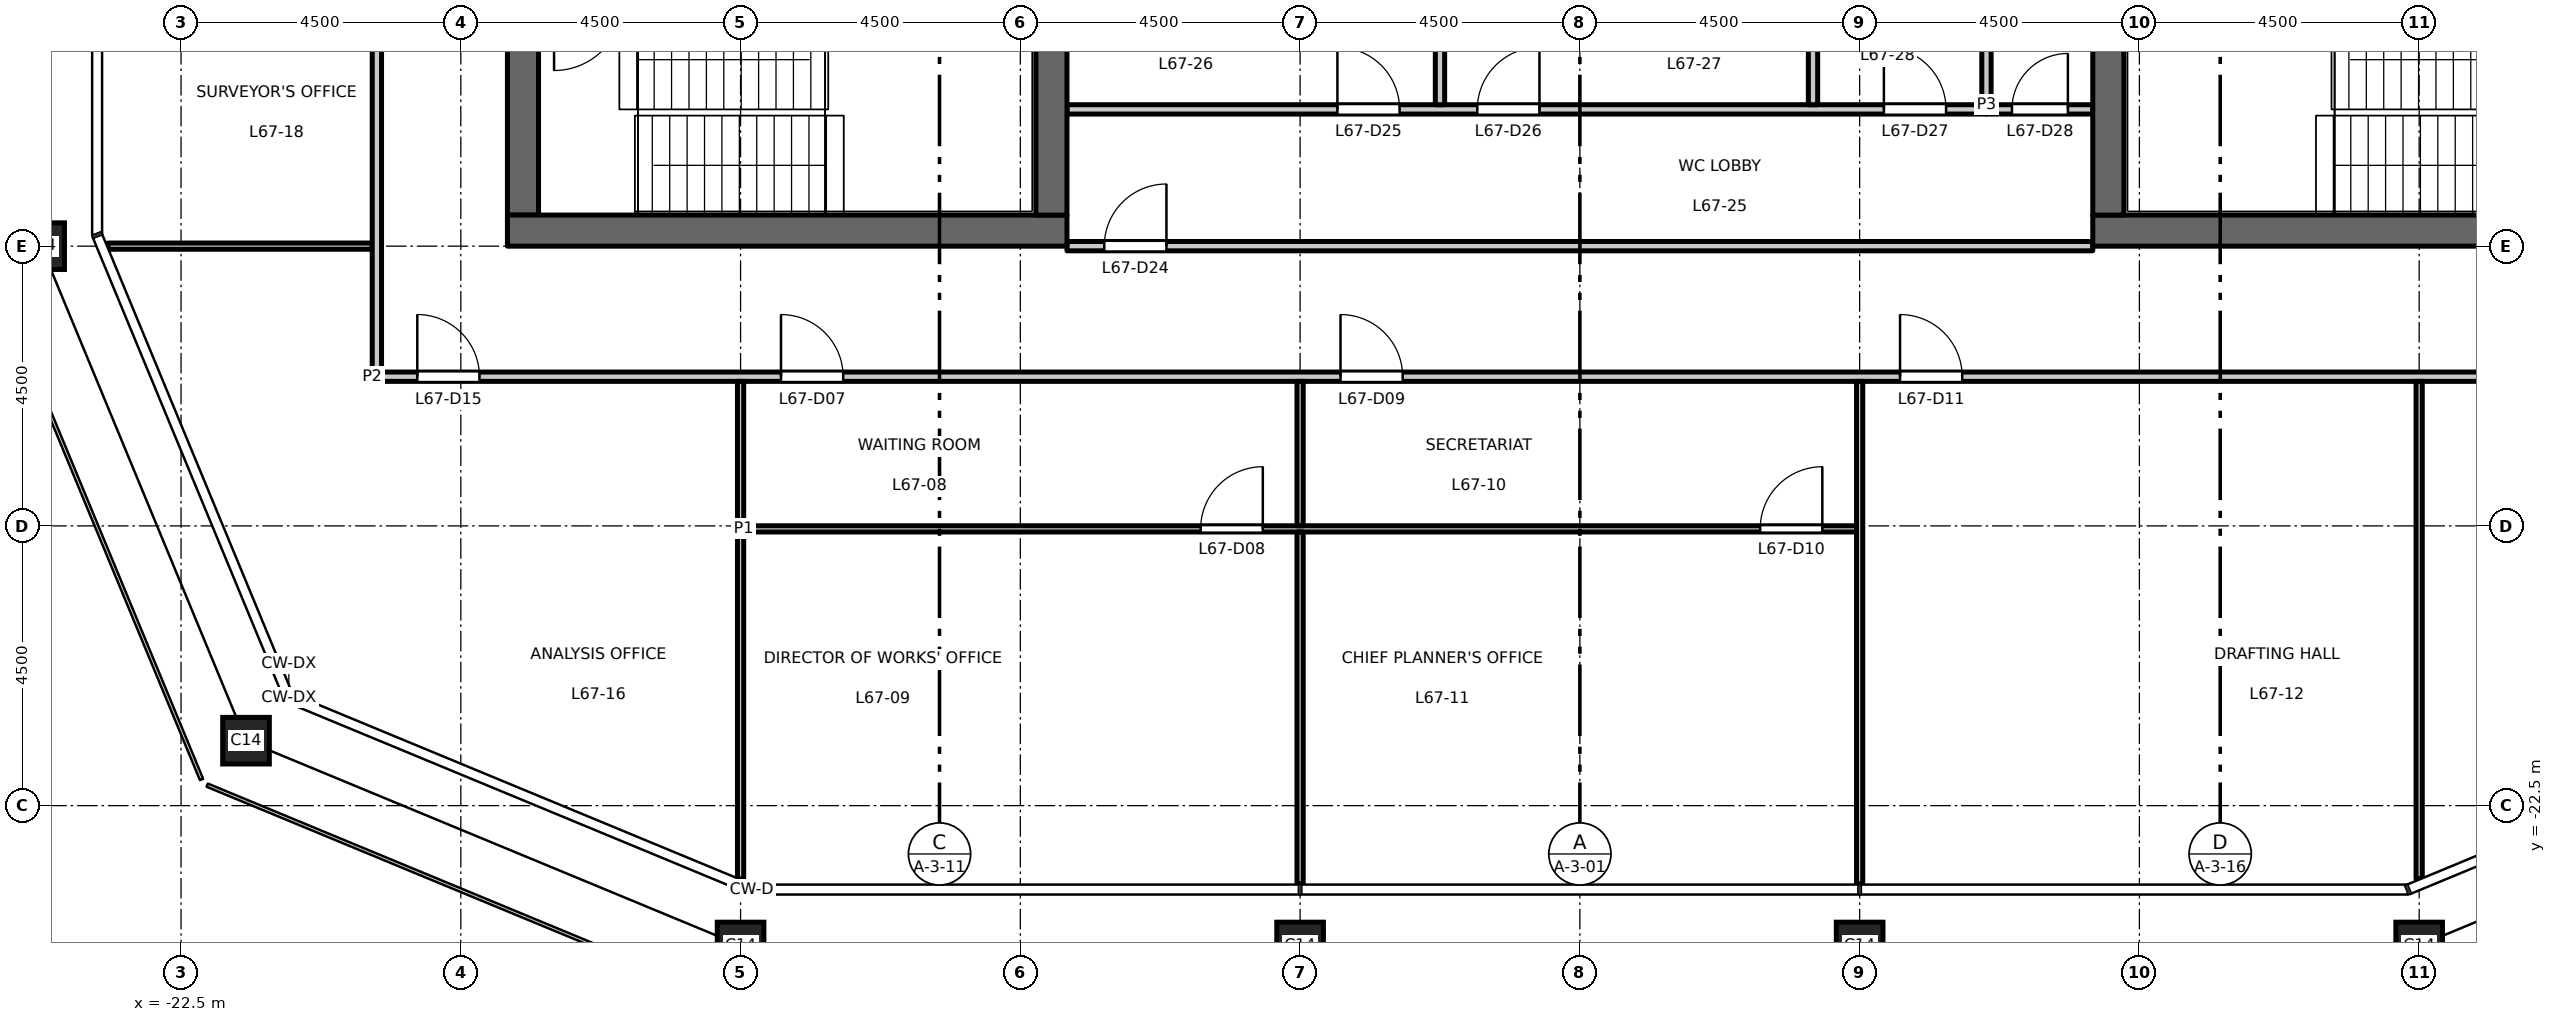
"""IFC4 building model, lengths in metres.
Left out: names, types, materials, properties, quantities, classifications, styles, units other than length and angle.
Written with IfcOpenShell. Run it as: python <this file> out.ifc"""

import sys

from ifc_helpers import new_model, si_unit, direction, frame, frame_2d, origin, origin_2d, place, context, subcontext, project, spatial, rectangle, hollow_rectangle, extrude, element, fill, save


model = new_model("IFC4")
c1 = context("Model", 3, precision=1e-05, world=origin(), true_north=direction((0.0, 1.0)))
c2 = subcontext(c1, "Body", "Model", "MODEL_VIEW")
j1 = project(units=[si_unit("LENGTHUNIT", "METRE"), si_unit("PLANEANGLEUNIT", "RADIAN")], contexts=[c1])
p1 = place(None, origin())
s1 = spatial("IfcSite", under=j1, at=p1, CompositionType="ELEMENT")
p2 = place(p1, origin())
s2 = spatial("IfcBuilding", under=s1, at=p2, CompositionType="ELEMENT")
p3 = place(p2, frame((0.0, 0.0, 312.2)))
s3 = spatial("IfcBuildingStorey", under=s2, at=p3, CompositionType="ELEMENT", Elevation=312.2)
for number, where, z_axis, x_axis in (
    (1, (-13.5, -24.75, 0.0), (0.0, 0.0, 1.0), (1.0, 0.0, 0.0)),
    (2, (-4.5, -24.75, 0.0), (0.0, 0.0, 1.0), (1.0, 0.0, 0.0)),
    (3, (4.5, -24.75, 0.0), (0.0, 0.0, 1.0), (1.0, 0.0, 0.0)),
    (4, (13.5, -24.75, 0.0), (0.0, 0.0, 1.0), (1.0, 0.0, 0.0)),
    (5, (-24.75, -13.5, 0.0), (0.0, 0.0, 1.0), (1.0, 0.0, 0.0)),
    (6, (-21.455, -21.455, 0.0), (0.0, 0.0, 1.0), (1.0, 0.0, 0.0)),
):
    element("IfcColumn", number, at=place(p3, frame(where, z_axis=z_axis, x_axis=x_axis)), inside=s3, PredefinedType="COLUMN", context=c2, shape_type="SweptSolid", body=[
        extrude(hollow_rectangle(XDim=0.75, YDim=0.75, WallThickness=0.04, at=origin_2d()), origin(), (0.0, 0.0, 1.0), 4.5),
    ])
p4 = place(p3, frame((-17.0, -13.0, 0.0), z_axis=(0.0, 0.0, 1.0), x_axis=(0.0, 1.0, 0.0)))
e7 = element("IfcWall", 7, at=p4, inside=s3, PredefinedType="SHEAR", context=c2, shape_type="SweptSolid", body=[
    extrude(rectangle(XDim=26.0, YDim=0.5, at=frame_2d((13.0, 0.0))), origin(), (0.0, 0.0, 1.0), 4.35),
])
p5 = place(p4, frame((16.825, 0.0, 0.0)))
e8 = element("IfcOpeningElement", 8, at=p5, cuts=e7, PredefinedType="OPENING", context=c2, shape_type="SweptSolid", body=[
    extrude(rectangle(XDim=1.8, YDim=2.1, at=frame_2d((0.9, 1.05))), frame((0.0, 0.26, 0.0), z_axis=(0.0, -1.0, 0.0), x_axis=(1.0, 0.0, 0.0)), (0.0, 0.0, 1.0), 0.52),
])
p6 = place(p4, frame((7.375, 0.0, 0.0)))
e9 = element("IfcOpeningElement", 9, at=p6, cuts=e7, PredefinedType="OPENING", context=c2, shape_type="SweptSolid", body=[
    extrude(rectangle(XDim=1.8, YDim=2.1, at=frame_2d((0.9, 1.05))), frame((0.0, 0.26, 0.0), z_axis=(0.0, -1.0, 0.0), x_axis=(1.0, 0.0, 0.0)), (0.0, 0.0, 1.0), 0.52),
])
p7 = place(p3, frame((-8.25, -13.25, 0.0), z_axis=(0.0, 0.0, 1.0), x_axis=(-1.0, 0.0, 0.0)))
e10 = element("IfcWall", 10, at=p7, inside=s3, PredefinedType="SHEAR", context=c2, shape_type="SweptSolid", body=[
    extrude(rectangle(XDim=9.0, YDim=0.5, at=frame_2d((4.5, 0.0))), origin(), (0.0, 0.0, 1.0), 4.35),
])
p8 = place(p3, frame((-8.5, -13.0, 0.0), z_axis=(0.0, 0.0, 1.0), x_axis=(0.0, 1.0, 0.0)))
e11 = element("IfcWall", 11, at=p8, inside=s3, PredefinedType="SHEAR", context=c2, shape_type="SweptSolid", body=[
    extrude(rectangle(XDim=26.0, YDim=0.5, at=frame_2d((13.0, 0.0))), origin(), (0.0, 0.0, 1.0), 4.35),
])
p9 = place(p3, frame((8.25, -13.25, 0.0), z_axis=(0.0, 0.0, 1.0), x_axis=(1.0, 0.0, 0.0)))
e12 = element("IfcWall", 12, at=p9, inside=s3, PredefinedType="SHEAR", context=c2, shape_type="SweptSolid", body=[
    extrude(rectangle(XDim=9.0, YDim=0.5, at=frame_2d((4.5, 0.0))), origin(), (0.0, 0.0, 1.0), 4.35),
])
p10 = place(p3, frame((8.5, -13.0, 0.0), z_axis=(0.0, 0.0, 1.0), x_axis=(0.0, 1.0, 0.0)))
e13 = element("IfcWall", 13, at=p10, inside=s3, PredefinedType="SHEAR", context=c2, shape_type="SweptSolid", body=[
    extrude(rectangle(XDim=26.0, YDim=0.5, at=frame_2d((13.0, 0.0))), origin(), (0.0, 0.0, 1.0), 4.35),
])
p11 = place(p3, frame((-13.45, -18.048, 0.0), z_axis=(0.0, 0.0, 1.0), x_axis=(1.0, 0.0, 0.0)))
e14 = element("IfcWall", 14, at=p11, inside=s3, PredefinedType="PARTITIONING", context=c2, shape_type="SweptSolid", body=[
    extrude(rectangle(XDim=17.9, YDim=0.1, at=frame_2d((8.95, 0.0))), origin(), (0.0, 0.0, 1.0), 3.99),
])
p12 = place(p11, frame((7.35, 0.0, 0.0)))
e15 = element("IfcOpeningElement", 15, at=p12, cuts=e14, PredefinedType="OPENING", context=c2, shape_type="SweptSolid", body=[
    extrude(rectangle(XDim=1.0, YDim=2.1, at=frame_2d((0.5, 1.05))), frame((0.0, 0.06, 0.0), z_axis=(0.0, -1.0, 0.0), x_axis=(1.0, 0.0, 0.0)), (0.0, 0.0, 1.0), 0.12),
])
p13 = place(p11, frame((16.35, 0.0, 0.0)))
e16 = element("IfcOpeningElement", 16, at=p13, cuts=e14, PredefinedType="OPENING", context=c2, shape_type="SweptSolid", body=[
    extrude(rectangle(XDim=1.0, YDim=2.1, at=frame_2d((0.5, 1.05))), frame((0.0, 0.06, 0.0), z_axis=(0.0, -1.0, 0.0), x_axis=(1.0, 0.0, 0.0)), (0.0, 0.0, 1.0), 0.12),
])
p14 = place(p3, frame((-19.425, -15.6, 0.0), z_axis=(0.0, 0.0, 1.0), x_axis=(1.0, 0.0, 0.0)))
e17 = element("IfcWall", 17, at=p14, inside=s3, PredefinedType="PARTITIONING", context=c2, shape_type="SweptSolid", body=[
    extrude(rectangle(XDim=38.85, YDim=0.15, at=frame_2d((19.425, 0.0))), origin(), (0.0, 0.0, 1.0), 4.35),
])
p15 = place(p14, frame((6.575, 0.0, 0.0)))
e18 = element("IfcOpeningElement", 18, at=p15, cuts=e17, PredefinedType="OPENING", context=c2, shape_type="SweptSolid", body=[
    extrude(rectangle(XDim=1.0, YDim=2.1, at=frame_2d((0.5, 1.05))), frame((0.0, 0.085, 0.0), z_axis=(0.0, -1.0, 0.0), x_axis=(1.0, 0.0, 0.0)), (0.0, 0.0, 1.0), 0.17),
])
p16 = place(p14, frame((15.575, 0.0, 0.0)))
e19 = element("IfcOpeningElement", 19, at=p16, cuts=e17, PredefinedType="OPENING", context=c2, shape_type="SweptSolid", body=[
    extrude(rectangle(XDim=1.0, YDim=2.1, at=frame_2d((0.5, 1.05))), frame((0.0, 0.085, 0.0), z_axis=(0.0, -1.0, 0.0), x_axis=(1.0, 0.0, 0.0)), (0.0, 0.0, 1.0), 0.17),
])
p17 = place(p14, frame((24.575, 0.0, 0.0)))
e20 = element("IfcOpeningElement", 20, at=p17, cuts=e17, PredefinedType="OPENING", context=c2, shape_type="SweptSolid", body=[
    extrude(rectangle(XDim=1.0, YDim=2.1, at=frame_2d((0.5, 1.05))), frame((0.0, 0.085, 0.0), z_axis=(0.0, -1.0, 0.0), x_axis=(1.0, 0.0, 0.0)), (0.0, 0.0, 1.0), 0.17),
])
p18 = place(p14, frame((0.725, 0.0, 0.0)))
e21 = element("IfcOpeningElement", 21, at=p18, cuts=e17, PredefinedType="OPENING", context=c2, shape_type="SweptSolid", body=[
    extrude(rectangle(XDim=1.0, YDim=2.1, at=frame_2d((0.5, 1.05))), frame((0.0, 0.085, 0.0), z_axis=(0.0, -1.0, 0.0), x_axis=(1.0, 0.0, 0.0)), (0.0, 0.0, 1.0), 0.17),
])
p19 = place(p14, frame((37.075, 0.0, 0.0)))
e22 = element("IfcOpeningElement", 22, at=p19, cuts=e17, PredefinedType="OPENING", context=c2, shape_type="SweptSolid", body=[
    extrude(rectangle(XDim=1.0, YDim=2.1, at=frame_2d((0.5, 1.05))), frame((0.0, 0.085, 0.0), z_axis=(0.0, -1.0, 0.0), x_axis=(1.0, 0.0, 0.0)), (0.0, 0.0, 1.0), 0.17),
])
p20 = place(p3, frame((-23.678, -13.5, 0.0), z_axis=(0.0, 0.0, 1.0), x_axis=(1.0, 0.0, 0.0)))
e23 = element("IfcWall", 23, at=p20, inside=s3, PredefinedType="PARTITIONING", context=c2, shape_type="SweptSolid", body=[
    extrude(rectangle(XDim=4.253, YDim=0.1, at=frame_2d((2.126, 0.0))), origin(), (0.0, 0.0, 1.0), 4.35),
])
p21 = place(p3, frame((-8.25, -13.5, 0.0), z_axis=(0.0, 0.0, 1.0), x_axis=(1.0, 0.0, 0.0)))
e24 = element("IfcWall", 24, at=p21, inside=s3, PredefinedType="PARTITIONING", context=c2, shape_type="SweptSolid", body=[
    extrude(rectangle(XDim=16.5, YDim=0.15, at=frame_2d((8.25, 0.0))), origin(), (0.0, 0.0, 1.0), 4.35),
])
p22 = place(p21, frame((0.6, 0.0, 0.0)))
e25 = element("IfcOpeningElement", 25, at=p22, cuts=e24, PredefinedType="OPENING", context=c2, shape_type="SweptSolid", body=[
    extrude(rectangle(XDim=1.0, YDim=2.1, at=frame_2d((0.5, 1.05))), frame((0.0, 0.085, 0.0), z_axis=(0.0, -1.0, 0.0), x_axis=(1.0, 0.0, 0.0)), (0.0, 0.0, 1.0), 0.17),
])
p23 = place(p3, frame((-8.25, -11.3, 0.0), z_axis=(0.0, 0.0, 1.0), x_axis=(1.0, 0.0, 0.0)))
e26 = element("IfcWall", 26, at=p23, inside=s3, PredefinedType="PARTITIONING", context=c2, shape_type="SweptSolid", body=[
    extrude(rectangle(XDim=14.79, YDim=0.15, at=frame_2d((7.395, 0.0))), origin(), (0.0, 0.0, 1.0), 4.35),
])
p24 = place(p23, frame((4.35, 0.0, 0.0)))
e27 = element("IfcOpeningElement", 27, at=p24, cuts=e26, PredefinedType="OPENING", context=c2, shape_type="SweptSolid", body=[
    extrude(rectangle(XDim=1.0, YDim=2.1, at=frame_2d((0.5, 1.05))), frame((0.0, 0.085, 0.0), z_axis=(0.0, -1.0, 0.0), x_axis=(1.0, 0.0, 0.0)), (0.0, 0.0, 1.0), 0.17),
])
p25 = place(p23, frame((6.6, 0.0, 0.0)))
e28 = element("IfcOpeningElement", 28, at=p25, cuts=e26, PredefinedType="OPENING", context=c2, shape_type="SweptSolid", body=[
    extrude(rectangle(XDim=1.0, YDim=2.1, at=frame_2d((0.5, 1.05))), frame((0.0, 0.085, 0.0), z_axis=(0.0, -1.0, 0.0), x_axis=(1.0, 0.0, 0.0)), (0.0, 0.0, 1.0), 0.17),
])
p26 = place(p23, frame((13.14, 0.0, 0.0)))
e29 = element("IfcOpeningElement", 29, at=p26, cuts=e26, PredefinedType="OPENING", context=c2, shape_type="SweptSolid", body=[
    extrude(rectangle(XDim=1.0, YDim=2.1, at=frame_2d((0.5, 1.05))), frame((0.0, 0.085, 0.0), z_axis=(0.0, -1.0, 0.0), x_axis=(1.0, 0.0, 0.0)), (0.0, 0.0, 1.0), 0.17),
])
p27 = place(p3, frame((6.54, -11.3, 0.0), z_axis=(0.0, 0.0, 1.0), x_axis=(1.0, 0.0, 0.0)))
e30 = element("IfcWall", 30, at=p27, inside=s3, PredefinedType="PARTITIONING", context=c2, shape_type="SweptSolid", body=[
    extrude(rectangle(XDim=1.71, YDim=0.15, at=frame_2d((0.855, 0.0))), origin(), (0.0, 0.0, 1.0), 4.35),
])
p28 = place(p27, frame((0.41, 0.0, 0.0)))
e31 = element("IfcOpeningElement", 31, at=p28, cuts=e30, PredefinedType="OPENING", context=c2, shape_type="SweptSolid", body=[
    extrude(rectangle(XDim=0.9, YDim=2.1, at=frame_2d((0.45, 1.05))), frame((0.0, 0.085, 0.0), z_axis=(0.0, -1.0, 0.0), x_axis=(1.0, 0.0, 0.0)), (0.0, 0.0, 1.0), 0.17),
])
p29 = place(p3, frame((-19.35, -15.525, 0.0), z_axis=(0.0, 0.0, 1.0), x_axis=(0.0, 1.0, 0.0)))
e32 = element("IfcWall", 32, at=p29, inside=s3, PredefinedType="PARTITIONING", context=c2, shape_type="SweptSolid", body=[
    extrude(rectangle(XDim=31.05, YDim=0.15, at=frame_2d((15.525, 0.0))), origin(), (0.0, 0.0, 1.0), 4.35),
])
p30 = place(p29, frame((9.375, 0.0, 0.0)))
e33 = element("IfcOpeningElement", 33, at=p30, cuts=e32, PredefinedType="OPENING", context=c2, shape_type="SweptSolid", body=[
    extrude(rectangle(XDim=1.0, YDim=2.1, at=frame_2d((0.5, 1.05))), frame((0.0, 0.085, 0.0), z_axis=(0.0, -1.0, 0.0), x_axis=(1.0, 0.0, 0.0)), (0.0, 0.0, 1.0), 0.17),
])
p31 = place(p29, frame((11.625, 0.0, 0.0)))
e34 = element("IfcOpeningElement", 34, at=p31, cuts=e32, PredefinedType="OPENING", context=c2, shape_type="SweptSolid", body=[
    extrude(rectangle(XDim=1.0, YDim=2.1, at=frame_2d((0.5, 1.05))), frame((0.0, 0.085, 0.0), z_axis=(0.0, -1.0, 0.0), x_axis=(1.0, 0.0, 0.0)), (0.0, 0.0, 1.0), 0.17),
])
p32 = place(p29, frame((27.375, 0.0, 0.0)))
e35 = element("IfcOpeningElement", 35, at=p32, cuts=e32, PredefinedType="OPENING", context=c2, shape_type="SweptSolid", body=[
    extrude(rectangle(XDim=1.0, YDim=2.1, at=frame_2d((0.5, 1.05))), frame((0.0, 0.085, 0.0), z_axis=(0.0, -1.0, 0.0), x_axis=(1.0, 0.0, 0.0)), (0.0, 0.0, 1.0), 0.17),
])
p33 = place(p3, frame((-13.5, -23.678, 0.0), z_axis=(0.0, 0.0, 1.0), x_axis=(0.0, 1.0, 0.0)))
e36 = element("IfcWall", 36, at=p33, inside=s3, PredefinedType="PARTITIONING", context=c2, shape_type="SweptSolid", body=[
    extrude(rectangle(XDim=8.003, YDim=0.1, at=frame_2d((4.001, 0.0))), origin(), (0.0, 0.0, 1.0), 3.75),
])
p34 = place(p3, frame((-4.5, -23.76, 0.0), z_axis=(0.0, 0.0, 1.0), x_axis=(0.0, 1.0, 0.0)))
e37 = element("IfcWall", 37, at=p34, inside=s3, PredefinedType="PARTITIONING", context=c2, shape_type="SweptSolid", body=[
    extrude(rectangle(XDim=5.662, YDim=0.1, at=frame_2d((2.831, 0.0))), origin(), (0.0, 0.0, 1.0), 3.65),
])
p35 = place(p3, frame((-4.5, -17.998, 0.0), z_axis=(0.0, 0.0, 1.0), x_axis=(0.0, 1.0, 0.0)))
e38 = element("IfcWall", 38, at=p35, inside=s3, PredefinedType="PARTITIONING", context=c2, shape_type="SweptSolid", body=[
    extrude(rectangle(XDim=2.323, YDim=0.1, at=frame_2d((1.162, 0.0))), origin(), (0.0, 0.0, 1.0), 3.65),
])
for number, where, z_axis, x_axis in (
    (39, (-2.25, -11.225, 0.0), (0.0, 0.0, 1.0), (0.0, 1.0, 0.0)),
    (40, (3.75, -11.225, 0.0), (0.0, 0.0, 1.0), (0.0, 1.0, 0.0)),
):
    element("IfcWall", number, at=place(p3, frame(where, z_axis=z_axis, x_axis=x_axis)), inside=s3, PredefinedType="PARTITIONING", context=c2, shape_type="SweptSolid", body=[
        extrude(rectangle(XDim=2.855, YDim=0.15, at=frame_2d((1.427, 0.0))), origin(), (0.0, 0.0, 1.0), 4.35),
    ])
p36 = place(p3, frame((4.5, -23.76, 0.0), z_axis=(0.0, 0.0, 1.0), x_axis=(0.0, 1.0, 0.0)))
e41 = element("IfcWall", 41, at=p36, inside=s3, PredefinedType="PARTITIONING", context=c2, shape_type="SweptSolid", body=[
    extrude(rectangle(XDim=8.085, YDim=0.1, at=frame_2d((4.042, 0.0))), origin(), (0.0, 0.0, 1.0), 3.65),
])
p37 = place(p3, frame((6.54, -11.225, 0.0), z_axis=(0.0, 0.0, 1.0), x_axis=(0.0, 1.0, 0.0)))
e42 = element("IfcWall", 42, at=p37, inside=s3, PredefinedType="PARTITIONING", context=c2, shape_type="SweptSolid", body=[
    extrude(rectangle(XDim=3.039, YDim=0.15, at=frame_2d((1.52, 0.0))), origin(), (0.0, 0.0, 1.0), 4.35),
])
p38 = place(p3, frame((13.5, -23.678, 0.0), z_axis=(0.0, 0.0, 1.0), x_axis=(0.0, 1.0, 0.0)))
e43 = element("IfcWall", 43, at=p38, inside=s3, PredefinedType="PARTITIONING", context=c2, shape_type="SweptSolid", body=[
    extrude(rectangle(XDim=8.003, YDim=0.1, at=frame_2d((4.001, 0.0))), origin(), (0.0, 0.0, 1.0), 3.75),
])
p39 = place(p15, origin())
e44 = element("IfcDoor", 44, at=p39, inside=s3, OperationType="SINGLE_SWING_LEFT", PredefinedType="DOOR", context=c2, shape_type="SweptSolid", body=[
    extrude(rectangle(XDim=1.0, YDim=2.1, at=frame_2d((0.5, 1.05))), frame((0.0, 0.025, 0.0), z_axis=(0.0, -1.0, 0.0), x_axis=(1.0, 0.0, 0.0)), (0.0, 0.0, 1.0), 0.05),
])
fill(e18, e44)
p40 = place(p12, origin())
e45 = element("IfcDoor", 45, at=p40, inside=s3, OperationType="SINGLE_SWING_RIGHT", PredefinedType="DOOR", context=c2, shape_type="SweptSolid", body=[
    extrude(rectangle(XDim=1.0, YDim=2.1, at=frame_2d((0.5, 1.05))), frame((0.0, 0.025, 0.0), z_axis=(0.0, -1.0, 0.0), x_axis=(1.0, 0.0, 0.0)), (0.0, 0.0, 1.0), 0.05),
])
fill(e15, e45)
p41 = place(p16, origin())
e46 = element("IfcDoor", 46, at=p41, inside=s3, OperationType="SINGLE_SWING_LEFT", PredefinedType="DOOR", context=c2, shape_type="SweptSolid", body=[
    extrude(rectangle(XDim=1.0, YDim=2.1, at=frame_2d((0.5, 1.05))), frame((0.0, 0.025, 0.0), z_axis=(0.0, -1.0, 0.0), x_axis=(1.0, 0.0, 0.0)), (0.0, 0.0, 1.0), 0.05),
])
fill(e19, e46)
p42 = place(p13, origin())
e47 = element("IfcDoor", 47, at=p42, inside=s3, OperationType="SINGLE_SWING_RIGHT", PredefinedType="DOOR", context=c2, shape_type="SweptSolid", body=[
    extrude(rectangle(XDim=1.0, YDim=2.1, at=frame_2d((0.5, 1.05))), frame((0.0, 0.025, 0.0), z_axis=(0.0, -1.0, 0.0), x_axis=(1.0, 0.0, 0.0)), (0.0, 0.0, 1.0), 0.05),
])
fill(e16, e47)
p43 = place(p17, origin())
e48 = element("IfcDoor", 48, at=p43, inside=s3, OperationType="SINGLE_SWING_LEFT", PredefinedType="DOOR", context=c2, shape_type="SweptSolid", body=[
    extrude(rectangle(XDim=1.0, YDim=2.1, at=frame_2d((0.5, 1.05))), frame((0.0, 0.025, 0.0), z_axis=(0.0, -1.0, 0.0), x_axis=(1.0, 0.0, 0.0)), (0.0, 0.0, 1.0), 0.05),
])
fill(e20, e48)
p44 = place(p18, origin())
e49 = element("IfcDoor", 49, at=p44, inside=s3, OperationType="SINGLE_SWING_LEFT", PredefinedType="DOOR", context=c2, shape_type="SweptSolid", body=[
    extrude(rectangle(XDim=1.0, YDim=2.1, at=frame_2d((0.5, 1.05))), frame((0.0, 0.025, 0.0), z_axis=(0.0, -1.0, 0.0), x_axis=(1.0, 0.0, 0.0)), (0.0, 0.0, 1.0), 0.05),
])
fill(e21, e49)
p45 = place(p22, origin())
e50 = element("IfcDoor", 50, at=p45, inside=s3, OperationType="SINGLE_SWING_RIGHT", PredefinedType="DOOR", context=c2, shape_type="SweptSolid", body=[
    extrude(rectangle(XDim=1.0, YDim=2.1, at=frame_2d((0.5, 1.05))), frame((0.0, 0.025, 0.0), z_axis=(0.0, -1.0, 0.0), x_axis=(1.0, 0.0, 0.0)), (0.0, 0.0, 1.0), 0.05),
])
fill(e25, e50)
p46 = place(p24, origin())
e51 = element("IfcDoor", 51, at=p46, inside=s3, OperationType="SINGLE_SWING_LEFT", PredefinedType="DOOR", context=c2, shape_type="SweptSolid", body=[
    extrude(rectangle(XDim=1.0, YDim=2.1, at=frame_2d((0.5, 1.05))), frame((0.0, 0.025, 0.0), z_axis=(0.0, -1.0, 0.0), x_axis=(1.0, 0.0, 0.0)), (0.0, 0.0, 1.0), 0.05),
])
fill(e27, e51)
p47 = place(p25, origin())
e52 = element("IfcDoor", 52, at=p47, inside=s3, OperationType="SINGLE_SWING_RIGHT", PredefinedType="DOOR", context=c2, shape_type="SweptSolid", body=[
    extrude(rectangle(XDim=1.0, YDim=2.1, at=frame_2d((0.5, 1.05))), frame((0.0, 0.025, 0.0), z_axis=(0.0, -1.0, 0.0), x_axis=(1.0, 0.0, 0.0)), (0.0, 0.0, 1.0), 0.05),
])
fill(e28, e52)
p48 = place(p26, origin())
e53 = element("IfcDoor", 53, at=p48, inside=s3, OperationType="SINGLE_SWING_LEFT", PredefinedType="DOOR", context=c2, shape_type="SweptSolid", body=[
    extrude(rectangle(XDim=1.0, YDim=2.1, at=frame_2d((0.5, 1.05))), frame((0.0, 0.025, 0.0), z_axis=(0.0, -1.0, 0.0), x_axis=(1.0, 0.0, 0.0)), (0.0, 0.0, 1.0), 0.05),
])
fill(e29, e53)
p49 = place(p28, origin())
e54 = element("IfcDoor", 54, at=p49, inside=s3, OperationType="SINGLE_SWING_RIGHT", PredefinedType="DOOR", context=c2, shape_type="SweptSolid", body=[
    extrude(rectangle(XDim=0.9, YDim=2.1, at=frame_2d((0.45, 1.05))), frame((0.0, 0.025, 0.0), z_axis=(0.0, -1.0, 0.0), x_axis=(1.0, 0.0, 0.0)), (0.0, 0.0, 1.0), 0.05),
])
fill(e31, e54)
save(model, sys.argv[1])
